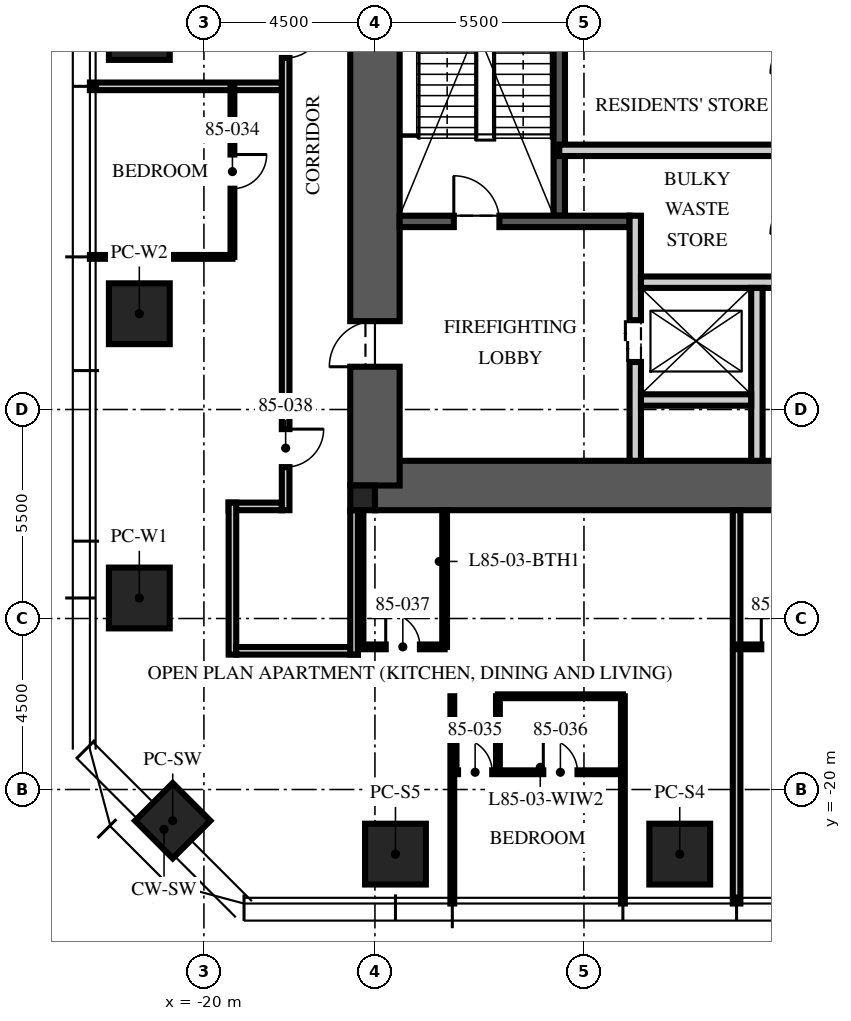
"""IFC4 building model, lengths in metres.
Left out: names, types, materials, properties, quantities, classifications, styles, units other than length and angle.
Written with IfcOpenShell. Run it as: python <this file> out.ifc"""

import sys

from ifc_helpers import new_model, si_unit, direction, frame, frame_2d, origin, origin_2d, place, context, subcontext, project, spatial, rectangle, extrude, element, fill, save


model = new_model("IFC4")
c1 = context("Model", 3, precision=1e-05, world=origin(), true_north=direction((0.0, 1.0)))
c2 = subcontext(c1, "Body", "Model", "MODEL_VIEW")
j1 = project(units=[si_unit("LENGTHUNIT", "METRE"), si_unit("PLANEANGLEUNIT", "RADIAN")], contexts=[c1])
p1 = place(None, origin())
s1 = spatial("IfcSite", under=j1, at=p1, CompositionType="ELEMENT")
p2 = place(p1, origin())
s2 = spatial("IfcBuilding", under=s1, at=p2, CompositionType="ELEMENT")
p3 = place(p2, frame((0.0, 0.0, 338.25)))
s3 = spatial("IfcBuildingStorey", under=s2, at=p3, CompositionType="ELEMENT", Elevation=338.25)
p4 = place(p3, frame((-15.5, -12.0, -0.25), z_axis=(0.0, 0.0, 1.0), x_axis=(1.0, 0.0, 0.0)))
e1 = element("IfcWall", 1, at=p4, inside=s3, PredefinedType="SHEAR", context=c2, shape_type="SweptSolid", body=[
    extrude(rectangle(XDim=31.0, YDim=1.3, at=frame_2d((15.5, 0.0))), origin(), (0.0, 0.0, 1.0), 3.75),
])
p5 = place(p3, frame((-15.5, -12.0, -0.25), z_axis=(0.0, 0.0, 1.0), x_axis=(0.0, 1.0, 0.0)))
e2 = element("IfcWall", 2, at=p5, inside=s3, PredefinedType="SHEAR", context=c2, shape_type="SweptSolid", body=[
    extrude(rectangle(XDim=24.0, YDim=1.3, at=frame_2d((12.0, 0.0))), origin(), (0.0, 0.0, 1.0), 3.75),
])
p6 = place(p5, frame((3.125, 0.0, 0.25)))
e3 = element("IfcOpeningElement", 3, at=p6, cuts=e2, PredefinedType="OPENING", context=c2, shape_type="SweptSolid", body=[
    extrude(rectangle(XDim=1.2, YDim=2.1, at=frame_2d((0.6, 1.05))), frame((0.0, 0.66, 0.0), z_axis=(0.0, -1.0, 0.0), x_axis=(1.0, 0.0, 0.0)), (0.0, 0.0, 1.0), 1.32),
])
p7 = place(p5, frame((19.375, 0.0, 0.25)))
e4 = element("IfcOpeningElement", 4, at=p7, cuts=e2, PredefinedType="OPENING", context=c2, shape_type="SweptSolid", body=[
    extrude(rectangle(XDim=1.8, YDim=2.1, at=frame_2d((0.9, 1.05))), frame((0.0, 0.66, 0.0), z_axis=(0.0, -1.0, 0.0), x_axis=(1.0, 0.0, 0.0)), (0.0, 0.0, 1.0), 1.32),
])
p8 = place(p3, frame((-15.825, -12.325, -0.25), z_axis=(0.0, 0.0, 1.0), x_axis=(1.0, 0.0, 0.0)))
e5 = element("IfcColumn", 5, at=p8, inside=s3, PredefinedType="COLUMN", context=c2, shape_type="SweptSolid", body=[
    extrude(rectangle(XDim=0.65, YDim=0.65, at=origin_2d()), origin(), (0.0, 0.0, 1.0), 3.75),
])
for number, where, z_axis, x_axis in (
    (6, (-7.48, -21.7, 0.0), (0.0, 0.0, 1.0), (1.0, 0.0, 0.0)),
    (7, (-14.96, -21.7, 0.0), (0.0, 0.0, 1.0), (1.0, 0.0, 0.0)),
    (8, (-21.7, -14.96, 0.0), (0.0, 0.0, 1.0), (0.0, 1.0, 0.0)),
    (9, (-21.7, -7.48, 0.0), (0.0, 0.0, 1.0), (0.0, 1.0, 0.0)),
    (10, (-21.7, 0.0, 0.0), (0.0, 0.0, 1.0), (0.0, 1.0, 0.0)),
):
    element("IfcColumn", number, at=place(p3, frame(where, z_axis=z_axis, x_axis=x_axis)), inside=s3, PredefinedType="COLUMN", context=c2, shape_type="SweptSolid", body=[
        extrude(rectangle(XDim=1.6, YDim=1.6, at=origin_2d()), origin(), (0.0, 0.0, 1.0), 3.75),
    ])
p9 = place(p3, frame((-20.821, -20.821, 0.0), z_axis=(0.0, 0.0, 1.0), x_axis=(0.707106781187, -0.707106781187, 0.0)))
e11 = element("IfcColumn", 11, at=p9, inside=s3, PredefinedType="COLUMN", context=c2, shape_type="SweptSolid", body=[
    extrude(rectangle(XDim=1.4, YDim=1.4, at=origin_2d()), origin(), (0.0, 0.0, 1.0), 3.75),
])
p10 = place(p3, frame((-10.65, -4.9, 0.0), z_axis=(0.0, 0.0, 1.0), x_axis=(0.0, 1.0, 0.0)))
e12 = element("IfcWall", 12, at=p10, inside=s3, PredefinedType="SOLIDWALL", context=c2, shape_type="SweptSolid", body=[
    extrude(rectangle(XDim=10.1, YDim=0.3, at=frame_2d((5.05, 0.0))), origin(), (0.0, 0.0, 1.0), 3.5),
])
p11 = place(p3, frame((-14.85, -5.05, 0.0), z_axis=(0.0, 0.0, 1.0), x_axis=(1.0, 0.0, 0.0)))
e13 = element("IfcWall", 13, at=p11, inside=s3, PredefinedType="SOLIDWALL", context=c2, shape_type="SweptSolid", body=[
    extrude(rectangle(XDim=6.05, YDim=0.3, at=frame_2d((3.025, 0.0))), origin(), (0.0, 0.0, 1.0), 3.5),
])
p12 = place(p11, frame((1.425, 0.0, 0.0)))
e14 = element("IfcOpeningElement", 14, at=p12, cuts=e13, PredefinedType="OPENING", context=c2, shape_type="SweptSolid", body=[
    extrude(rectangle(XDim=1.2, YDim=2.1, at=frame_2d((0.6, 1.05))), frame((0.0, 0.16, 0.0), z_axis=(0.0, -1.0, 0.0), x_axis=(1.0, 0.0, 0.0)), (0.0, 0.0, 1.0), 0.32),
])
p13 = place(p3, frame((-8.65, -11.35, 0.0), z_axis=(0.0, 0.0, 1.0), x_axis=(0.0, 1.0, 0.0)))
e15 = element("IfcWall", 15, at=p13, inside=s3, PredefinedType="PARTITIONING", context=c2, shape_type="SweptSolid", body=[
    extrude(rectangle(XDim=6.45, YDim=0.3, at=frame_2d((3.225, 0.0))), origin(), (0.0, 0.0, 1.0), 3.5),
])
p14 = place(p13, frame((2.6, 0.0, 0.0)))
e16 = element("IfcOpeningElement", 16, at=p14, cuts=e15, PredefinedType="OPENING", context=c2, shape_type="SweptSolid", body=[
    extrude(rectangle(XDim=1.1, YDim=2.1, at=frame_2d((0.55, 1.05))), frame((0.0, 0.16, 0.0), z_axis=(0.0, -1.0, 0.0), x_axis=(1.0, 0.0, 0.0)), (0.0, 0.0, 1.0), 0.32),
])
p15 = place(p3, frame((-8.5, -6.65, 0.0), z_axis=(0.0, 0.0, 1.0), x_axis=(1.0, 0.0, 0.0)))
e17 = element("IfcWall", 17, at=p15, inside=s3, PredefinedType="PARTITIONING", context=c2, shape_type="SweptSolid", body=[
    extrude(rectangle(XDim=17.0, YDim=0.3, at=frame_2d((8.5, 0.0))), origin(), (0.0, 0.0, 1.0), 3.5),
])
p16 = place(p15, frame((7.8, 0.0, 0.0)))
e18 = element("IfcOpeningElement", 18, at=p16, cuts=e17, PredefinedType="OPENING", context=c2, shape_type="SweptSolid", body=[
    extrude(rectangle(XDim=1.3, YDim=2.4, at=frame_2d((0.65, 1.2))), frame((0.0, 0.16, 0.0), z_axis=(0.0, -1.0, 0.0), x_axis=(1.0, 0.0, 0.0)), (0.0, 0.0, 1.0), 0.32),
])
p17 = place(p15, frame((5.65, 0.0, 0.0)))
e19 = element("IfcOpeningElement", 19, at=p17, cuts=e17, PredefinedType="OPENING", context=c2, shape_type="SweptSolid", body=[
    extrude(rectangle(XDim=0.9, YDim=2.1, at=frame_2d((0.45, 1.05))), frame((0.0, 0.16, 0.0), z_axis=(0.0, -1.0, 0.0), x_axis=(1.0, 0.0, 0.0)), (0.0, 0.0, 1.0), 0.32),
])
p18 = place(p15, frame((10.4, 0.0, 0.0)))
e20 = element("IfcOpeningElement", 20, at=p18, cuts=e17, PredefinedType="OPENING", context=c2, shape_type="SweptSolid", body=[
    extrude(rectangle(XDim=0.9, YDim=2.1, at=frame_2d((0.45, 1.05))), frame((0.0, 0.16, 0.0), z_axis=(0.0, -1.0, 0.0), x_axis=(1.0, 0.0, 0.0)), (0.0, 0.0, 1.0), 0.32),
])
p19 = place(p3, frame((-5.45, -11.35, 0.0), z_axis=(0.0, 0.0, 1.0), x_axis=(0.0, 1.0, 0.0)))
e21 = element("IfcWall", 21, at=p19, inside=s3, PredefinedType="PARTITIONING", context=c2, shape_type="SweptSolid", body=[
    extrude(rectangle(XDim=4.55, YDim=0.3, at=frame_2d((2.275, 0.0))), origin(), (0.0, 0.0, 1.0), 3.5),
])
p20 = place(p3, frame((-8.5, -9.75, 0.0), z_axis=(0.0, 0.0, 1.0), x_axis=(1.0, 0.0, 0.0)))
e22 = element("IfcWall", 22, at=p20, inside=s3, PredefinedType="PARTITIONING", context=c2, shape_type="SweptSolid", body=[
    extrude(rectangle(XDim=2.9, YDim=0.3, at=frame_2d((1.45, 0.0))), origin(), (0.0, 0.0, 1.0), 3.5),
])
p21 = place(p3, frame((-10.65, -3.18, 0.0), z_axis=(0.0, 0.0, 1.0), x_axis=(1.0, 0.0, 0.0)))
e23 = element("IfcWall", 23, at=p21, inside=s3, PredefinedType="PARTITIONING", context=c2, shape_type="SweptSolid", body=[
    extrude(rectangle(XDim=6.45, YDim=0.3, at=frame_2d((3.225, 0.0))), origin(), (0.0, 0.0, 1.0), 3.5),
])
p22 = place(p3, frame((-17.95, -12.55, 0.0), z_axis=(0.0, 0.0, 1.0), x_axis=(-1.0, 0.0, 0.0)))
e24 = element("IfcWall", 24, at=p22, inside=s3, PredefinedType="PARTITIONING", context=c2, shape_type="SweptSolid", body=[
    extrude(rectangle(XDim=1.4, YDim=0.2, at=frame_2d((0.7, 0.0))), origin(), (0.0, 0.0, 1.0), 3.5),
])
p23 = place(p3, frame((-19.25, -12.45, 0.0), z_axis=(0.0, 0.0, 1.0), x_axis=(0.0, -1.0, 0.0)))
e25 = element("IfcWall", 25, at=p23, inside=s3, PredefinedType="PARTITIONING", context=c2, shape_type="SweptSolid", body=[
    extrude(rectangle(XDim=4.0, YDim=0.2, at=frame_2d((2.0, 0.0))), origin(), (0.0, 0.0, 1.0), 2.9),
])
p24 = place(p3, frame((-19.15, -16.35, 0.0), z_axis=(0.0, 0.0, 1.0), x_axis=(1.0, 0.0, 0.0)))
e26 = element("IfcWall", 26, at=p24, inside=s3, PredefinedType="PARTITIONING", context=c2, shape_type="SweptSolid", body=[
    extrude(rectangle(XDim=3.2, YDim=0.2, at=frame_2d((1.6, 0.0))), origin(), (0.0, 0.0, 1.0), 2.6),
])
p25 = place(p3, frame((-16.05, -16.45, 0.0), z_axis=(0.0, 0.0, 1.0), x_axis=(0.0, 1.0, 0.0)))
e27 = element("IfcWall", 27, at=p25, inside=s3, PredefinedType="PARTITIONING", context=c2, shape_type="SweptSolid", body=[
    extrude(rectangle(XDim=3.8, YDim=0.2, at=frame_2d((1.9, 0.0))), origin(), (0.0, 0.0, 1.0), 2.6),
])
p26 = place(p3, frame((-17.95, -1.496, 0.0), z_axis=(0.0, 0.0, 1.0), x_axis=(-1.0, 0.0, 0.0)))
e28 = element("IfcWall", 28, at=p26, inside=s3, PredefinedType="PARTITIONING", context=c2, shape_type="SweptSolid", body=[
    extrude(rectangle(XDim=5.05, YDim=0.2, at=frame_2d((2.525, 0.0))), origin(), (0.0, 0.0, 1.0), 3.01),
])
p27 = place(p3, frame((-19.25, -5.984, 0.0), z_axis=(0.0, 0.0, 1.0), x_axis=(-1.0, 0.0, 0.0)))
e29 = element("IfcWall", 29, at=p27, inside=s3, PredefinedType="PARTITIONING", context=c2, shape_type="SweptSolid", body=[
    extrude(rectangle(XDim=3.75, YDim=0.1, at=frame_2d((1.875, 0.0))), origin(), (0.0, 0.0, 1.0), 3.01),
])
for number, where, z_axis, x_axis in (
    (30, (-13.464, -17.546, 0.0), (0.0, 0.0, 1.0), (0.0, -1.0, 0.0)),
    (31, (-8.976, -17.546, 0.0), (0.0, 0.0, 1.0), (0.0, -1.0, 0.0)),
):
    element("IfcWall", number, at=place(p3, frame(where, z_axis=z_axis, x_axis=x_axis)), inside=s3, PredefinedType="PARTITIONING", context=c2, shape_type="SweptSolid", body=[
        extrude(rectangle(XDim=5.454, YDim=0.1, at=frame_2d((2.727, 0.0))), origin(), (0.0, 0.0, 1.0), 3.01),
    ])
p28 = place(p3, frame((-5.984, -12.65, 0.0), z_axis=(0.0, 0.0, 1.0), x_axis=(0.0, -1.0, 0.0)))
e32 = element("IfcWall", 32, at=p28, inside=s3, PredefinedType="PARTITIONING", context=c2, shape_type="SweptSolid", body=[
    extrude(rectangle(XDim=10.35, YDim=0.2, at=frame_2d((5.175, 0.0))), origin(), (0.0, 0.0, 1.0), 3.01),
])
p29 = place(p3, frame((-19.25, -1.496, 0.0), z_axis=(0.0, 0.0, 1.0), x_axis=(0.0, -1.0, 0.0)))
e33 = element("IfcWall", 33, at=p29, inside=s3, PredefinedType="PARTITIONING", context=c2, shape_type="SweptSolid", body=[
    extrude(rectangle(XDim=4.488, YDim=0.1, at=frame_2d((2.244, 0.0))), origin(), (0.0, 0.0, 1.0), 2.91),
])
p30 = place(p29, frame((1.794, 0.0, 0.0)))
e34 = element("IfcOpeningElement", 34, at=p30, cuts=e33, PredefinedType="OPENING", context=c2, shape_type="SweptSolid", body=[
    extrude(rectangle(XDim=0.9, YDim=2.1, at=frame_2d((0.45, 1.05))), frame((0.0, 0.06, 0.0), z_axis=(0.0, -1.0, 0.0), x_axis=(1.0, 0.0, 0.0)), (0.0, 0.0, 1.0), 0.12),
])
p31 = place(p3, frame((-13.464, -19.546, 0.0), z_axis=(0.0, 0.0, 1.0), x_axis=(1.0, 0.0, 0.0)))
e35 = element("IfcWall", 35, at=p31, inside=s3, PredefinedType="PARTITIONING", context=c2, shape_type="SweptSolid", body=[
    extrude(rectangle(XDim=4.488, YDim=0.1, at=frame_2d((2.244, 0.0))), origin(), (0.0, 0.0, 1.0), 2.91),
])
p32 = place(p31, frame((0.15, 0.0, 0.0)))
e36 = element("IfcOpeningElement", 36, at=p32, cuts=e35, PredefinedType="OPENING", context=c2, shape_type="SweptSolid", body=[
    extrude(rectangle(XDim=0.9, YDim=2.1, at=frame_2d((0.45, 1.05))), frame((0.0, 0.06, 0.0), z_axis=(0.0, -1.0, 0.0), x_axis=(1.0, 0.0, 0.0)), (0.0, 0.0, 1.0), 0.12),
])
p33 = place(p31, frame((2.394, 0.0, 0.0)))
e37 = element("IfcOpeningElement", 37, at=p33, cuts=e35, PredefinedType="OPENING", context=c2, shape_type="SweptSolid", body=[
    extrude(rectangle(XDim=0.9, YDim=2.1, at=frame_2d((0.45, 1.05))), frame((0.0, 0.06, 0.0), z_axis=(0.0, -1.0, 0.0), x_axis=(1.0, 0.0, 0.0)), (0.0, 0.0, 1.0), 0.12),
])
p34 = place(p3, frame((-12.264, -17.546, 0.0), z_axis=(0.0, 0.0, 1.0), x_axis=(0.0, -1.0, 0.0)))
e38 = element("IfcWall", 38, at=p34, inside=s3, PredefinedType="PARTITIONING", context=c2, shape_type="SweptSolid", body=[
    extrude(rectangle(XDim=2.0, YDim=0.1, at=frame_2d((1.0, 0.0))), origin(), (0.0, 0.0, 1.0), 3.5),
])
p35 = place(p3, frame((-12.264, -17.546, 0.0), z_axis=(0.0, 0.0, 1.0), x_axis=(1.0, 0.0, 0.0)))
e39 = element("IfcWall", 39, at=p35, inside=s3, PredefinedType="PARTITIONING", context=c2, shape_type="SweptSolid", body=[
    extrude(rectangle(XDim=3.288, YDim=0.1, at=frame_2d((1.644, 0.0))), origin(), (0.0, 0.0, 1.0), 2.91),
])
p36 = place(p3, frame((-15.866, -16.246, 0.0), z_axis=(0.0, 0.0, 1.0), x_axis=(1.0, 0.0, 0.0)))
e40 = element("IfcWall", 40, at=p36, inside=s3, PredefinedType="PARTITIONING", context=c2, shape_type="SweptSolid", body=[
    extrude(rectangle(XDim=2.2, YDim=0.125, at=frame_2d((1.1, 0.0))), origin(), (0.0, 0.0, 1.0), 2.9),
])
p37 = place(p36, frame((0.65, 0.0, 0.0)))
e41 = element("IfcOpeningElement", 41, at=p37, cuts=e40, PredefinedType="OPENING", context=c2, shape_type="SweptSolid", body=[
    extrude(rectangle(XDim=0.9, YDim=2.1, at=frame_2d((0.45, 1.05))), frame((0.0, 0.073, 0.0), z_axis=(0.0, -1.0, 0.0), x_axis=(1.0, 0.0, 0.0)), (0.0, 0.0, 1.0), 0.145),
])
p38 = place(p3, frame((-15.866, -12.65, 0.0), z_axis=(0.0, 0.0, 1.0), x_axis=(0.0, -1.0, 0.0)))
e42 = element("IfcWall", 42, at=p38, inside=s3, PredefinedType="PARTITIONING", context=c2, shape_type="SweptSolid", body=[
    extrude(rectangle(XDim=3.596, YDim=0.125, at=frame_2d((1.798, 0.0))), origin(), (0.0, 0.0, 1.0), 2.6),
])
p39 = place(p3, frame((-13.667, -12.65, 0.0), z_axis=(0.0, 0.0, 1.0), x_axis=(0.0, -1.0, 0.0)))
e43 = element("IfcWall", 43, at=p39, inside=s3, PredefinedType="PARTITIONING", context=c2, shape_type="SweptSolid", body=[
    extrude(rectangle(XDim=3.596, YDim=0.125, at=frame_2d((1.798, 0.0))), origin(), (0.0, 0.0, 1.0), 3.5),
])
p40 = place(p3, frame((-5.984, -16.246, 0.0), z_axis=(0.0, 0.0, 1.0), x_axis=(1.0, 0.0, 0.0)))
e44 = element("IfcWall", 44, at=p40, inside=s3, PredefinedType="PARTITIONING", context=c2, shape_type="SweptSolid", body=[
    extrude(rectangle(XDim=2.2, YDim=0.125, at=frame_2d((1.1, 0.0))), origin(), (0.0, 0.0, 1.0), 2.91),
])
p41 = place(p40, frame((0.65, 0.0, 0.0)))
e45 = element("IfcOpeningElement", 45, at=p41, cuts=e44, PredefinedType="OPENING", context=c2, shape_type="SweptSolid", body=[
    extrude(rectangle(XDim=0.9, YDim=2.1, at=frame_2d((0.45, 1.05))), frame((0.0, 0.073, 0.0), z_axis=(0.0, -1.0, 0.0), x_axis=(1.0, 0.0, 0.0)), (0.0, 0.0, 1.0), 0.145),
])
p42 = place(p3, frame((-17.85, 12.85, 0.0), z_axis=(0.0, 0.0, 1.0), x_axis=(0.0, -1.0, 0.0)))
e46 = element("IfcWall", 46, at=p42, inside=s3, PredefinedType="PARTITIONING", context=c2, shape_type="SweptSolid", body=[
    extrude(rectangle(XDim=25.5, YDim=0.2, at=frame_2d((12.75, 0.0))), origin(), (0.0, 0.0, 1.0), 2.9),
])
p43 = place(p42, frame((12.6, 0.0, 0.0)))
e47 = element("IfcOpeningElement", 47, at=p43, cuts=e46, PredefinedType="OPENING", context=c2, shape_type="SweptSolid", body=[
    extrude(rectangle(XDim=1.0, YDim=2.2, at=frame_2d((0.5, 1.1))), frame((0.0, 0.11, 0.0), z_axis=(0.0, -1.0, 0.0), x_axis=(1.0, 0.0, 0.0)), (0.0, 0.0, 1.0), 0.22),
])
p44 = place(p42, frame((23.366, 0.0, 0.0)))
e48 = element("IfcOpeningElement", 48, at=p44, cuts=e46, PredefinedType="OPENING", context=c2, shape_type="SweptSolid", body=[
    extrude(rectangle(XDim=1.0, YDim=2.2, at=frame_2d((0.5, 1.1))), frame((0.0, 0.11, 0.0), z_axis=(0.0, -1.0, 0.0), x_axis=(1.0, 0.0, 0.0)), (0.0, 0.0, 1.0), 0.22),
])
p45 = place(p12, origin())
e49 = element("IfcDoor", 49, at=p45, inside=s3, OperationType="SINGLE_SWING_LEFT", PredefinedType="DOOR", context=c2, shape_type="SweptSolid", body=[
    extrude(rectangle(XDim=1.2, YDim=2.1, at=frame_2d((0.6, 1.05))), frame((0.0, 0.025, 0.0), z_axis=(0.0, -1.0, 0.0), x_axis=(1.0, 0.0, 0.0)), (0.0, 0.0, 1.0), 0.05),
])
fill(e14, e49)
p46 = place(p6, origin())
e50 = element("IfcDoor", 50, at=p46, inside=s3, OperationType="SINGLE_SWING_LEFT", PredefinedType="DOOR", context=c2, shape_type="SweptSolid", body=[
    extrude(rectangle(XDim=1.2, YDim=2.1, at=frame_2d((0.6, 1.05))), frame((0.0, 0.025, 0.0), z_axis=(0.0, -1.0, 0.0), x_axis=(1.0, 0.0, 0.0)), (0.0, 0.0, 1.0), 0.05),
])
fill(e3, e50)
p47 = place(p14, origin())
e51 = element("IfcDoor", 51, at=p47, inside=s3, OperationType="DOUBLE_DOOR_SLIDING", PredefinedType="DOOR", context=c2, shape_type="SweptSolid", body=[
    extrude(rectangle(XDim=1.1, YDim=2.1, at=frame_2d((0.55, 1.05))), frame((0.0, 0.025, 0.0), z_axis=(0.0, -1.0, 0.0), x_axis=(1.0, 0.0, 0.0)), (0.0, 0.0, 1.0), 0.05),
])
fill(e16, e51)
p48 = place(p43, origin())
e52 = element("IfcDoor", 52, at=p48, inside=s3, OperationType="SINGLE_SWING_LEFT", PredefinedType="DOOR", context=c2, shape_type="SweptSolid", body=[
    extrude(rectangle(XDim=1.0, YDim=2.2, at=frame_2d((0.5, 1.1))), frame((0.0, 0.025, 0.0), z_axis=(0.0, -1.0, 0.0), x_axis=(1.0, 0.0, 0.0)), (0.0, 0.0, 1.0), 0.05),
])
fill(e47, e52)
p49 = place(p30, origin())
e53 = element("IfcDoor", 53, at=p49, inside=s3, OperationType="SINGLE_SWING_LEFT", PredefinedType="DOOR", context=c2, shape_type="SweptSolid", body=[
    extrude(rectangle(XDim=0.9, YDim=2.1, at=frame_2d((0.45, 1.05))), frame((0.0, 0.025, 0.0), z_axis=(0.0, -1.0, 0.0), x_axis=(1.0, 0.0, 0.0)), (0.0, 0.0, 1.0), 0.05),
])
fill(e34, e53)
p50 = place(p32, origin())
e54 = element("IfcDoor", 54, at=p50, inside=s3, OperationType="SINGLE_SWING_LEFT", PredefinedType="DOOR", context=c2, shape_type="SweptSolid", body=[
    extrude(rectangle(XDim=0.9, YDim=2.1, at=frame_2d((0.45, 1.05))), frame((0.0, 0.025, 0.0), z_axis=(0.0, -1.0, 0.0), x_axis=(1.0, 0.0, 0.0)), (0.0, 0.0, 1.0), 0.05),
])
fill(e36, e54)
p51 = place(p33, origin())
e55 = element("IfcDoor", 55, at=p51, inside=s3, OperationType="SINGLE_SWING_LEFT", PredefinedType="DOOR", context=c2, shape_type="SweptSolid", body=[
    extrude(rectangle(XDim=0.9, YDim=2.1, at=frame_2d((0.45, 1.05))), frame((0.0, 0.025, 0.0), z_axis=(0.0, -1.0, 0.0), x_axis=(1.0, 0.0, 0.0)), (0.0, 0.0, 1.0), 0.05),
])
fill(e37, e55)
p52 = place(p37, origin())
e56 = element("IfcDoor", 56, at=p52, inside=s3, OperationType="SINGLE_SWING_LEFT", PredefinedType="DOOR", context=c2, shape_type="SweptSolid", body=[
    extrude(rectangle(XDim=0.9, YDim=2.1, at=frame_2d((0.45, 1.05))), frame((0.0, 0.025, 0.0), z_axis=(0.0, -1.0, 0.0), x_axis=(1.0, 0.0, 0.0)), (0.0, 0.0, 1.0), 0.05),
])
fill(e41, e56)
p53 = place(p44, origin())
e57 = element("IfcDoor", 57, at=p53, inside=s3, OperationType="SINGLE_SWING_LEFT", PredefinedType="DOOR", context=c2, shape_type="SweptSolid", body=[
    extrude(rectangle(XDim=1.0, YDim=2.2, at=frame_2d((0.5, 1.1))), frame((0.0, 0.025, 0.0), z_axis=(0.0, -1.0, 0.0), x_axis=(1.0, 0.0, 0.0)), (0.0, 0.0, 1.0), 0.05),
])
fill(e48, e57)
p54 = place(p41, origin())
e58 = element("IfcDoor", 58, at=p54, inside=s3, OperationType="SINGLE_SWING_LEFT", PredefinedType="DOOR", context=c2, shape_type="SweptSolid", body=[
    extrude(rectangle(XDim=0.9, YDim=2.1, at=frame_2d((0.45, 1.05))), frame((0.0, 0.025, 0.0), z_axis=(0.0, -1.0, 0.0), x_axis=(1.0, 0.0, 0.0)), (0.0, 0.0, 1.0), 0.05),
])
fill(e45, e58)
save(model, sys.argv[1])
